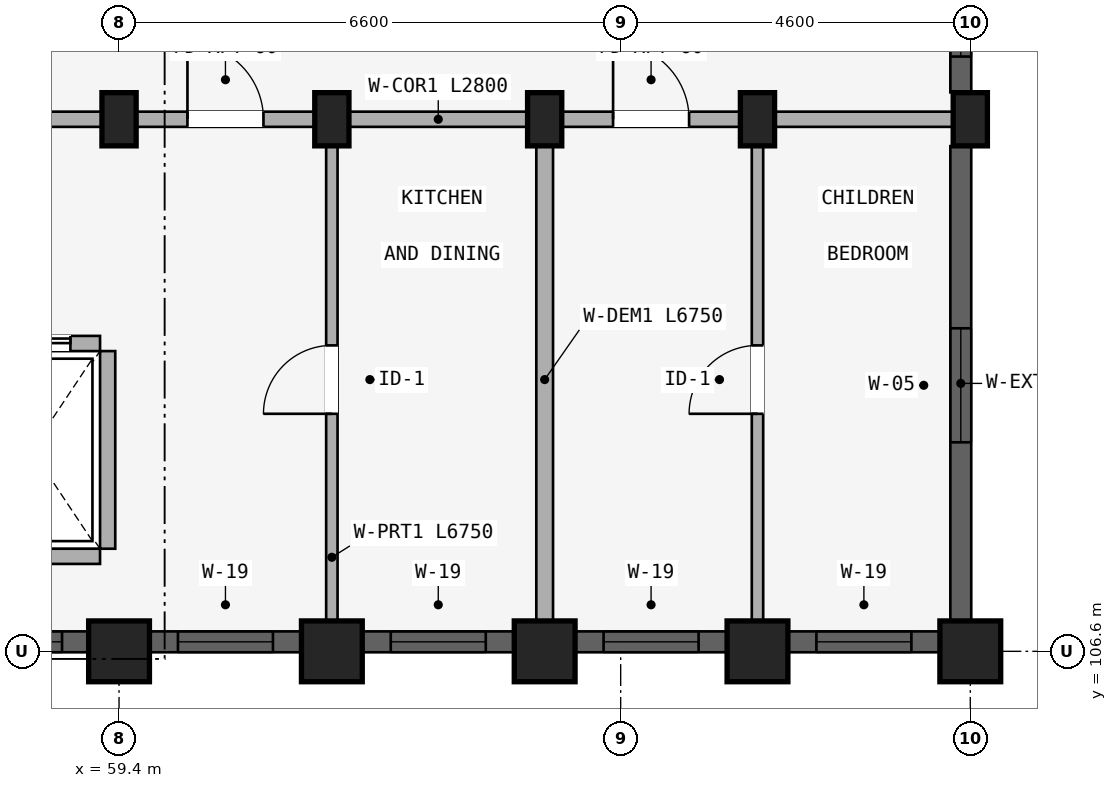
"""IFC4 building model, lengths in metres.
Left out: names, types, materials, properties, quantities, classifications, styles, units other than length and angle.
Written with IfcOpenShell. Run it as: python <this file> out.ifc"""

import sys

from ifc_helpers import new_model, si_unit, direction, frame, frame_2d, origin, origin_2d, place, context, subcontext, project, spatial, rectangle, extrude, element, fill, save


model = new_model("IFC4")
c1 = context("Model", 3, precision=1e-05, world=origin(), true_north=direction((0.0, 1.0)))
c2 = subcontext(c1, "Body", "Model", "MODEL_VIEW")
j1 = project(units=[si_unit("LENGTHUNIT", "METRE"), si_unit("PLANEANGLEUNIT", "RADIAN")], contexts=[c1])
p1 = place(None, origin())
s1 = spatial("IfcSite", under=j1, at=p1, CompositionType="ELEMENT")
p2 = place(p1, origin())
s2 = spatial("IfcBuilding", under=s1, at=p2, CompositionType="ELEMENT")
p3 = place(p2, frame((0.0, 0.0, 11.85)))
s3 = spatial("IfcBuildingStorey", under=s2, at=p3, CompositionType="ELEMENT", Elevation=11.85)
p4 = place(p3, frame((59.4, 106.6, 0.0), z_axis=(0.0, 0.0, 1.0), x_axis=(1.0, 0.0, 0.0)))
e1 = element("IfcColumn", 1, at=p4, inside=s3, PredefinedType="COLUMN", context=c2, shape_type="SweptSolid", body=[
    extrude(rectangle(XDim=0.8, YDim=0.8, at=origin_2d()), origin(), (0.0, 0.0, 1.0), 2.93),
])
p5 = place(p3, frame((59.4, 113.6, 0.0), z_axis=(0.0, 0.0, 1.0), x_axis=(1.0, 0.0, 0.0)))
e2 = element("IfcColumn", 2, at=p5, inside=s3, PredefinedType="COLUMN", context=c2, shape_type="SweptSolid", body=[
    extrude(rectangle(XDim=0.45, YDim=0.7, at=origin_2d()), origin(), (0.0, 0.0, 1.0), 2.93),
])
p6 = place(p3, frame((62.2, 106.6, 0.0), z_axis=(0.0, 0.0, 1.0), x_axis=(1.0, 0.0, 0.0)))
e3 = element("IfcColumn", 3, at=p6, inside=s3, PredefinedType="COLUMN", context=c2, shape_type="SweptSolid", body=[
    extrude(rectangle(XDim=0.8, YDim=0.8, at=origin_2d()), origin(), (0.0, 0.0, 1.0), 2.93),
])
p7 = place(p3, frame((62.2, 113.6, 0.0), z_axis=(0.0, 0.0, 1.0), x_axis=(1.0, 0.0, 0.0)))
e4 = element("IfcColumn", 4, at=p7, inside=s3, PredefinedType="COLUMN", context=c2, shape_type="SweptSolid", body=[
    extrude(rectangle(XDim=0.45, YDim=0.7, at=origin_2d()), origin(), (0.0, 0.0, 1.0), 2.93),
])
p8 = place(p3, frame((65.0, 106.6, 0.0), z_axis=(0.0, 0.0, 1.0), x_axis=(1.0, 0.0, 0.0)))
e5 = element("IfcColumn", 5, at=p8, inside=s3, PredefinedType="COLUMN", context=c2, shape_type="SweptSolid", body=[
    extrude(rectangle(XDim=0.8, YDim=0.8, at=origin_2d()), origin(), (0.0, 0.0, 1.0), 2.93),
])
p9 = place(p3, frame((65.0, 113.6, 0.0), z_axis=(0.0, 0.0, 1.0), x_axis=(1.0, 0.0, 0.0)))
e6 = element("IfcColumn", 6, at=p9, inside=s3, PredefinedType="COLUMN", context=c2, shape_type="SweptSolid", body=[
    extrude(rectangle(XDim=0.45, YDim=0.7, at=origin_2d()), origin(), (0.0, 0.0, 1.0), 2.93),
])
p10 = place(p3, frame((67.8, 106.6, 0.0), z_axis=(0.0, 0.0, 1.0), x_axis=(1.0, 0.0, 0.0)))
e7 = element("IfcColumn", 7, at=p10, inside=s3, PredefinedType="COLUMN", context=c2, shape_type="SweptSolid", body=[
    extrude(rectangle(XDim=0.8, YDim=0.8, at=origin_2d()), origin(), (0.0, 0.0, 1.0), 2.93),
])
p11 = place(p3, frame((67.8, 113.6, 0.0), z_axis=(0.0, 0.0, 1.0), x_axis=(1.0, 0.0, 0.0)))
e8 = element("IfcColumn", 8, at=p11, inside=s3, PredefinedType="COLUMN", context=c2, shape_type="SweptSolid", body=[
    extrude(rectangle(XDim=0.45, YDim=0.7, at=origin_2d()), origin(), (0.0, 0.0, 1.0), 2.93),
])
p12 = place(p3, frame((70.6, 106.6, 0.0), z_axis=(0.0, 0.0, 1.0), x_axis=(1.0, 0.0, 0.0)))
e9 = element("IfcColumn", 9, at=p12, inside=s3, PredefinedType="COLUMN", context=c2, shape_type="SweptSolid", body=[
    extrude(rectangle(XDim=0.8, YDim=0.8, at=origin_2d()), origin(), (0.0, 0.0, 1.0), 2.93),
])
p13 = place(p3, frame((70.6, 113.6, 0.0), z_axis=(0.0, 0.0, 1.0), x_axis=(1.0, 0.0, 0.0)))
e10 = element("IfcColumn", 10, at=p13, inside=s3, PredefinedType="COLUMN", context=c2, shape_type="SweptSolid", body=[
    extrude(rectangle(XDim=0.45, YDim=0.7, at=origin_2d()), origin(), (0.0, 0.0, 1.0), 2.93),
])
p14 = place(p3, frame((59.25, 107.95, 0.0), z_axis=(0.0, 0.0, 1.0), x_axis=(0.0, 1.0, 0.0)))
e11 = element("IfcWall", 11, at=p14, inside=s3, PredefinedType="STANDARD", context=c2, shape_type="SweptSolid", body=[
    extrude(rectangle(XDim=2.6, YDim=0.2, at=frame_2d((1.3, 0.0))), origin(), (0.0, 0.0, 1.0), 2.372),
])
p15 = place(p3, frame((57.35, 107.85, 0.0), z_axis=(0.0, 0.0, 1.0), x_axis=(1.0, 0.0, 0.0)))
e12 = element("IfcWall", 12, at=p15, inside=s3, PredefinedType="STANDARD", context=c2, shape_type="SweptSolid", body=[
    extrude(rectangle(XDim=1.8, YDim=0.2, at=frame_2d((0.9, 0.0))), origin(), (0.0, 0.0, 1.0), 2.93),
])
p16 = place(p3, frame((57.35, 110.65, 0.0), z_axis=(0.0, 0.0, 1.0), x_axis=(1.0, 0.0, 0.0)))
e13 = element("IfcWall", 13, at=p16, inside=s3, PredefinedType="STANDARD", context=c2, shape_type="SweptSolid", body=[
    extrude(rectangle(XDim=1.8, YDim=0.2, at=frame_2d((0.9, 0.0))), origin(), (0.0, 0.0, 1.0), 2.93),
])
p17 = place(p16, frame((0.39, 0.0, 0.0)))
e14 = element("IfcOpeningElement", 14, at=p17, cuts=e13, PredefinedType="OPENING", context=c2, shape_type="SweptSolid", body=[
    extrude(rectangle(XDim=1.02, YDim=2.15, at=frame_2d((0.51, 1.075))), frame((0.0, 0.11, 0.0), z_axis=(0.0, -1.0, 0.0), x_axis=(1.0, 0.0, 0.0)), (0.0, 0.0, 1.0), 0.22),
])
p18 = place(p3, frame((53.75, 113.6, 0.0), z_axis=(0.0, 0.0, 1.0), x_axis=(1.0, 0.0, 0.0)))
e15 = element("IfcWall", 15, at=p18, inside=s3, PredefinedType="STANDARD", context=c2, shape_type="SweptSolid", body=[
    extrude(rectangle(XDim=5.6, YDim=0.2, at=frame_2d((2.8, 0.0))), origin(), (0.0, 0.0, 1.0), 2.372),
])
p19 = place(p18, frame((1.91, 0.0, 0.0)))
e16 = element("IfcOpeningElement", 16, at=p19, cuts=e15, PredefinedType="OPENING", context=c2, shape_type="SweptSolid", body=[
    extrude(rectangle(XDim=1.22, YDim=2.15, at=frame_2d((0.61, 1.075))), frame((0.0, 0.11, 0.0), z_axis=(0.0, -1.0, 0.0), x_axis=(1.0, 0.0, 0.0)), (0.0, 0.0, 1.0), 0.22),
])
p20 = place(p3, frame((59.4, 113.6, 0.0), z_axis=(0.0, 0.0, 1.0), x_axis=(1.0, 0.0, 0.0)))
e17 = element("IfcWall", 17, at=p20, inside=s3, PredefinedType="STANDARD", context=c2, shape_type="SweptSolid", body=[
    extrude(rectangle(XDim=2.8, YDim=0.2, at=frame_2d((1.4, 0.0))), origin(), (0.0, 0.0, 1.0), 2.372),
])
p21 = place(p20, frame((0.9, 0.0, 0.0)))
e18 = element("IfcOpeningElement", 18, at=p21, cuts=e17, PredefinedType="OPENING", context=c2, shape_type="SweptSolid", body=[
    extrude(rectangle(XDim=1.0, YDim=2.15, at=frame_2d((0.5, 1.075))), frame((0.0, 0.11, 0.0), z_axis=(0.0, -1.0, 0.0), x_axis=(1.0, 0.0, 0.0)), (0.0, 0.0, 1.0), 0.22),
])
p22 = place(p3, frame((62.2, 113.6, 0.0), z_axis=(0.0, 0.0, 1.0), x_axis=(1.0, 0.0, 0.0)))
e19 = element("IfcWall", 19, at=p22, inside=s3, PredefinedType="STANDARD", context=c2, shape_type="SweptSolid", body=[
    extrude(rectangle(XDim=2.8, YDim=0.2, at=frame_2d((1.4, 0.0))), origin(), (0.0, 0.0, 1.0), 2.372),
])
p23 = place(p3, frame((65.0, 113.6, 0.0), z_axis=(0.0, 0.0, 1.0), x_axis=(1.0, 0.0, 0.0)))
e20 = element("IfcWall", 20, at=p23, inside=s3, PredefinedType="STANDARD", context=c2, shape_type="SweptSolid", body=[
    extrude(rectangle(XDim=2.8, YDim=0.2, at=frame_2d((1.4, 0.0))), origin(), (0.0, 0.0, 1.0), 2.372),
])
p24 = place(p23, frame((0.9, 0.0, 0.0)))
e21 = element("IfcOpeningElement", 21, at=p24, cuts=e20, PredefinedType="OPENING", context=c2, shape_type="SweptSolid", body=[
    extrude(rectangle(XDim=1.0, YDim=2.15, at=frame_2d((0.5, 1.075))), frame((0.0, 0.11, 0.0), z_axis=(0.0, -1.0, 0.0), x_axis=(1.0, 0.0, 0.0)), (0.0, 0.0, 1.0), 0.22),
])
p25 = place(p3, frame((67.8, 113.6, 0.0), z_axis=(0.0, 0.0, 1.0), x_axis=(1.0, 0.0, 0.0)))
e22 = element("IfcWall", 22, at=p25, inside=s3, PredefinedType="STANDARD", context=c2, shape_type="SweptSolid", body=[
    extrude(rectangle(XDim=2.8, YDim=0.2, at=frame_2d((1.4, 0.0))), origin(), (0.0, 0.0, 1.0), 2.372),
])
p26 = place(p3, frame((62.2, 106.8, 0.0), z_axis=(0.0, 0.0, 1.0), x_axis=(0.0, 1.0, 0.0)))
e23 = element("IfcWall", 23, at=p26, inside=s3, PredefinedType="PARTITIONING", context=c2, shape_type="SweptSolid", body=[
    extrude(rectangle(XDim=6.75, YDim=0.15, at=frame_2d((3.375, 0.0))), origin(), (0.0, 0.0, 1.0), 2.372),
])
p27 = place(p26, frame((2.925, 0.0, 0.0)))
e24 = element("IfcOpeningElement", 24, at=p27, cuts=e23, PredefinedType="OPENING", context=c2, shape_type="SweptSolid", body=[
    extrude(rectangle(XDim=0.9, YDim=2.1, at=frame_2d((0.45, 1.05))), frame((0.0, 0.085, 0.0), z_axis=(0.0, -1.0, 0.0), x_axis=(1.0, 0.0, 0.0)), (0.0, 0.0, 1.0), 0.17),
])
p28 = place(p3, frame((65.0, 106.8, 0.0), z_axis=(0.0, 0.0, 1.0), x_axis=(0.0, 1.0, 0.0)))
e25 = element("IfcWall", 25, at=p28, inside=s3, PredefinedType="STANDARD", context=c2, shape_type="SweptSolid", body=[
    extrude(rectangle(XDim=6.75, YDim=0.22, at=frame_2d((3.375, 0.0))), origin(), (0.0, 0.0, 1.0), 2.372),
])
p29 = place(p3, frame((67.8, 106.8, 0.0), z_axis=(0.0, 0.0, 1.0), x_axis=(0.0, 1.0, 0.0)))
e26 = element("IfcWall", 26, at=p29, inside=s3, PredefinedType="PARTITIONING", context=c2, shape_type="SweptSolid", body=[
    extrude(rectangle(XDim=6.75, YDim=0.15, at=frame_2d((3.375, 0.0))), origin(), (0.0, 0.0, 1.0), 2.372),
])
p30 = place(p29, frame((2.925, 0.0, 0.0)))
e27 = element("IfcOpeningElement", 27, at=p30, cuts=e26, PredefinedType="OPENING", context=c2, shape_type="SweptSolid", body=[
    extrude(rectangle(XDim=0.9, YDim=2.1, at=frame_2d((0.45, 1.05))), frame((0.0, 0.085, 0.0), z_axis=(0.0, -1.0, 0.0), x_axis=(1.0, 0.0, 0.0)), (0.0, 0.0, 1.0), 0.17),
])
p31 = place(p3, frame((56.628, 106.725, 0.0), z_axis=(0.0, 0.0, 1.0), x_axis=(1.0, 0.0, 0.0)))
e28 = element("IfcWall", 28, at=p31, inside=s3, PredefinedType="STANDARD", context=c2, shape_type="SweptSolid", body=[
    extrude(rectangle(XDim=2.422, YDim=0.275, at=frame_2d((1.211, 0.0))), origin(), (0.0, 0.0, 1.0), 2.472),
])
p32 = place(p31, frame((0.822, 0.0, 0.772)))
e29 = element("IfcOpeningElement", 29, at=p32, cuts=e28, PredefinedType="OPENING", context=c2, shape_type="SweptSolid", body=[
    extrude(rectangle(XDim=1.2, YDim=1.5, at=frame_2d((0.6, 0.75))), frame((0.0, 0.147, 0.0), z_axis=(0.0, -1.0, 0.0), x_axis=(1.0, 0.0, 0.0)), (0.0, 0.0, 1.0), 0.295),
])
p33 = place(p3, frame((59.803, 106.725, 0.0), z_axis=(0.0, 0.0, 1.0), x_axis=(1.0, 0.0, 0.0)))
e30 = element("IfcWall", 30, at=p33, inside=s3, PredefinedType="STANDARD", context=c2, shape_type="SweptSolid", body=[
    extrude(rectangle(XDim=1.993, YDim=0.275, at=frame_2d((0.997, 0.0))), origin(), (0.0, 0.0, 1.0), 2.472),
])
p34 = place(p33, frame((0.372, 0.0, 0.722)))
e31 = element("IfcOpeningElement", 31, at=p34, cuts=e30, PredefinedType="OPENING", context=c2, shape_type="SweptSolid", body=[
    extrude(rectangle(XDim=1.25, YDim=1.55, at=frame_2d((0.625, 0.775))), frame((0.0, 0.147, 0.0), z_axis=(0.0, -1.0, 0.0), x_axis=(1.0, 0.0, 0.0)), (0.0, 0.0, 1.0), 0.295),
])
p35 = place(p3, frame((62.604, 106.725, 0.0), z_axis=(0.0, 0.0, 1.0), x_axis=(1.0, 0.0, 0.0)))
e32 = element("IfcWall", 32, at=p35, inside=s3, PredefinedType="STANDARD", context=c2, shape_type="SweptSolid", body=[
    extrude(rectangle(XDim=1.993, YDim=0.275, at=frame_2d((0.997, 0.0))), origin(), (0.0, 0.0, 1.0), 2.472),
])
p36 = place(p35, frame((0.372, 0.0, 0.722)))
e33 = element("IfcOpeningElement", 33, at=p36, cuts=e32, PredefinedType="OPENING", context=c2, shape_type="SweptSolid", body=[
    extrude(rectangle(XDim=1.25, YDim=1.55, at=frame_2d((0.625, 0.775))), frame((0.0, 0.147, 0.0), z_axis=(0.0, -1.0, 0.0), x_axis=(1.0, 0.0, 0.0)), (0.0, 0.0, 1.0), 0.295),
])
p37 = place(p3, frame((65.404, 106.725, 0.0), z_axis=(0.0, 0.0, 1.0), x_axis=(1.0, 0.0, 0.0)))
e34 = element("IfcWall", 34, at=p37, inside=s3, PredefinedType="STANDARD", context=c2, shape_type="SweptSolid", body=[
    extrude(rectangle(XDim=1.993, YDim=0.275, at=frame_2d((0.997, 0.0))), origin(), (0.0, 0.0, 1.0), 2.472),
])
p38 = place(p37, frame((0.372, 0.0, 0.722)))
e35 = element("IfcOpeningElement", 35, at=p38, cuts=e34, PredefinedType="OPENING", context=c2, shape_type="SweptSolid", body=[
    extrude(rectangle(XDim=1.25, YDim=1.55, at=frame_2d((0.625, 0.775))), frame((0.0, 0.147, 0.0), z_axis=(0.0, -1.0, 0.0), x_axis=(1.0, 0.0, 0.0)), (0.0, 0.0, 1.0), 0.295),
])
p39 = place(p3, frame((68.204, 106.725, 0.0), z_axis=(0.0, 0.0, 1.0), x_axis=(1.0, 0.0, 0.0)))
e36 = element("IfcWall", 36, at=p39, inside=s3, PredefinedType="STANDARD", context=c2, shape_type="SweptSolid", body=[
    extrude(rectangle(XDim=1.993, YDim=0.275, at=frame_2d((0.997, 0.0))), origin(), (0.0, 0.0, 1.0), 2.472),
])
p40 = place(p39, frame((0.372, 0.0, 0.722)))
e37 = element("IfcOpeningElement", 37, at=p40, cuts=e36, PredefinedType="OPENING", context=c2, shape_type="SweptSolid", body=[
    extrude(rectangle(XDim=1.25, YDim=1.55, at=frame_2d((0.625, 0.775))), frame((0.0, 0.147, 0.0), z_axis=(0.0, -1.0, 0.0), x_axis=(1.0, 0.0, 0.0)), (0.0, 0.0, 1.0), 0.295),
])
p41 = place(p3, frame((70.475, 107.003, 0.0), z_axis=(0.0, 0.0, 1.0), x_axis=(0.0, 1.0, 0.0)))
e38 = element("IfcWall", 38, at=p41, inside=s3, PredefinedType="STANDARD", context=c2, shape_type="SweptSolid", body=[
    extrude(rectangle(XDim=6.243, YDim=0.275, at=frame_2d((3.122, 0.0))), origin(), (0.0, 0.0, 1.0), 2.372),
])
p42 = place(p41, frame((2.346, 0.0, 0.522)))
e39 = element("IfcOpeningElement", 39, at=p42, cuts=e38, PredefinedType="OPENING", context=c2, shape_type="SweptSolid", body=[
    extrude(rectangle(XDim=1.5, YDim=1.65, at=frame_2d((0.75, 0.825))), frame((0.0, 0.147, 0.0), z_axis=(0.0, -1.0, 0.0), x_axis=(1.0, 0.0, 0.0)), (0.0, 0.0, 1.0), 0.295),
])
p43 = place(p3, frame((70.475, 113.954, 0.0), z_axis=(0.0, 0.0, 1.0), x_axis=(0.0, 1.0, 0.0)))
e40 = element("IfcWall", 40, at=p43, inside=s3, PredefinedType="STANDARD", context=c2, shape_type="SweptSolid", body=[
    extrude(rectangle(XDim=1.693, YDim=0.275, at=frame_2d((0.846, 0.0))), origin(), (0.0, 0.0, 1.0), 2.372),
])
p44 = place(p43, frame((0.471, 0.0, 0.88)))
e41 = element("IfcOpeningElement", 41, at=p44, cuts=e40, PredefinedType="OPENING", context=c2, shape_type="SweptSolid", body=[
    extrude(rectangle(XDim=0.75, YDim=1.05, at=frame_2d((0.375, 0.525))), frame((0.0, 0.147, 0.0), z_axis=(0.0, -1.0, 0.0), x_axis=(1.0, 0.0, 0.0)), (0.0, 0.0, 1.0), 0.295),
])
p45 = place(p32, origin())
e42 = element("IfcWindow", 42, at=p45, inside=s3, PartitioningType="SINGLE_PANEL", PredefinedType="WINDOW", context=c2, shape_type="SweptSolid", body=[
    extrude(rectangle(XDim=1.2, YDim=1.5, at=frame_2d((0.6, 0.75))), frame((0.0, 0.03, 0.0), z_axis=(0.0, -1.0, 0.0), x_axis=(1.0, 0.0, 0.0)), (0.0, 0.0, 1.0), 0.06),
])
fill(e29, e42)
p46 = place(p34, origin())
e43 = element("IfcWindow", 43, at=p46, inside=s3, PartitioningType="SINGLE_PANEL", PredefinedType="WINDOW", context=c2, shape_type="SweptSolid", body=[
    extrude(rectangle(XDim=1.25, YDim=1.55, at=frame_2d((0.625, 0.775))), frame((0.0, 0.03, 0.0), z_axis=(0.0, -1.0, 0.0), x_axis=(1.0, 0.0, 0.0)), (0.0, 0.0, 1.0), 0.06),
])
fill(e31, e43)
p47 = place(p36, origin())
e44 = element("IfcWindow", 44, at=p47, inside=s3, PartitioningType="SINGLE_PANEL", PredefinedType="WINDOW", context=c2, shape_type="SweptSolid", body=[
    extrude(rectangle(XDim=1.25, YDim=1.55, at=frame_2d((0.625, 0.775))), frame((0.0, 0.03, 0.0), z_axis=(0.0, -1.0, 0.0), x_axis=(1.0, 0.0, 0.0)), (0.0, 0.0, 1.0), 0.06),
])
fill(e33, e44)
p48 = place(p38, origin())
e45 = element("IfcWindow", 45, at=p48, inside=s3, PartitioningType="SINGLE_PANEL", PredefinedType="WINDOW", context=c2, shape_type="SweptSolid", body=[
    extrude(rectangle(XDim=1.25, YDim=1.55, at=frame_2d((0.625, 0.775))), frame((0.0, 0.03, 0.0), z_axis=(0.0, -1.0, 0.0), x_axis=(1.0, 0.0, 0.0)), (0.0, 0.0, 1.0), 0.06),
])
fill(e35, e45)
p49 = place(p40, origin())
e46 = element("IfcWindow", 46, at=p49, inside=s3, PartitioningType="SINGLE_PANEL", PredefinedType="WINDOW", context=c2, shape_type="SweptSolid", body=[
    extrude(rectangle(XDim=1.25, YDim=1.55, at=frame_2d((0.625, 0.775))), frame((0.0, 0.03, 0.0), z_axis=(0.0, -1.0, 0.0), x_axis=(1.0, 0.0, 0.0)), (0.0, 0.0, 1.0), 0.06),
])
fill(e37, e46)
p50 = place(p42, origin())
e47 = element("IfcWindow", 47, at=p50, inside=s3, PartitioningType="DOUBLE_PANEL_VERTICAL", PredefinedType="WINDOW", context=c2, shape_type="SweptSolid", body=[
    extrude(rectangle(XDim=1.5, YDim=1.65, at=frame_2d((0.75, 0.825))), frame((0.0, 0.03, 0.0), z_axis=(0.0, -1.0, 0.0), x_axis=(1.0, 0.0, 0.0)), (0.0, 0.0, 1.0), 0.06),
])
fill(e39, e47)
p51 = place(p44, origin())
e48 = element("IfcWindow", 48, at=p51, inside=s3, PartitioningType="SINGLE_PANEL", PredefinedType="WINDOW", context=c2, shape_type="SweptSolid", body=[
    extrude(rectangle(XDim=0.75, YDim=1.05, at=frame_2d((0.375, 0.525))), frame((0.0, 0.03, 0.0), z_axis=(0.0, -1.0, 0.0), x_axis=(1.0, 0.0, 0.0)), (0.0, 0.0, 1.0), 0.06),
])
fill(e41, e48)
p52 = place(p17, origin())
e49 = element("IfcDoor", 49, at=p52, inside=s3, OperationType="SLIDING_TO_RIGHT", PredefinedType="DOOR", context=c2, shape_type="SweptSolid", body=[
    extrude(rectangle(XDim=1.02, YDim=2.15, at=frame_2d((0.51, 1.075))), frame((0.0, 0.025, 0.0), z_axis=(0.0, -1.0, 0.0), x_axis=(1.0, 0.0, 0.0)), (0.0, 0.0, 1.0), 0.05),
])
fill(e14, e49)
p53 = place(p21, frame((1.0, 0.0, 0.0), z_axis=(0.0, 0.0, 1.0), x_axis=(-1.0, 0.0, 0.0)))
e50 = element("IfcDoor", 50, at=p53, inside=s3, OperationType="SINGLE_SWING_RIGHT", PredefinedType="DOOR", context=c2, shape_type="SweptSolid", body=[
    extrude(rectangle(XDim=1.0, YDim=2.15, at=frame_2d((0.5, 1.075))), frame((0.0, 0.025, 0.0), z_axis=(0.0, -1.0, 0.0), x_axis=(1.0, 0.0, 0.0)), (0.0, 0.0, 1.0), 0.05),
])
fill(e18, e50)
p54 = place(p24, frame((1.0, 0.0, 0.0), z_axis=(0.0, 0.0, 1.0), x_axis=(-1.0, 0.0, 0.0)))
e51 = element("IfcDoor", 51, at=p54, inside=s3, OperationType="SINGLE_SWING_RIGHT", PredefinedType="DOOR", context=c2, shape_type="SweptSolid", body=[
    extrude(rectangle(XDim=1.0, YDim=2.15, at=frame_2d((0.5, 1.075))), frame((0.0, 0.025, 0.0), z_axis=(0.0, -1.0, 0.0), x_axis=(1.0, 0.0, 0.0)), (0.0, 0.0, 1.0), 0.05),
])
fill(e21, e51)
p55 = place(p27, origin())
e52 = element("IfcDoor", 52, at=p55, inside=s3, OperationType="SINGLE_SWING_LEFT", PredefinedType="DOOR", context=c2, shape_type="SweptSolid", body=[
    extrude(rectangle(XDim=0.9, YDim=2.1, at=frame_2d((0.45, 1.05))), frame((0.0, 0.025, 0.0), z_axis=(0.0, -1.0, 0.0), x_axis=(1.0, 0.0, 0.0)), (0.0, 0.0, 1.0), 0.05),
])
fill(e24, e52)
p56 = place(p30, frame((0.9, 0.0, 0.0), z_axis=(0.0, 0.0, 1.0), x_axis=(-1.0, 0.0, 0.0)))
e53 = element("IfcDoor", 53, at=p56, inside=s3, OperationType="SINGLE_SWING_RIGHT", PredefinedType="DOOR", context=c2, shape_type="SweptSolid", body=[
    extrude(rectangle(XDim=0.9, YDim=2.1, at=frame_2d((0.45, 1.05))), frame((0.0, 0.025, 0.0), z_axis=(0.0, -1.0, 0.0), x_axis=(1.0, 0.0, 0.0)), (0.0, 0.0, 1.0), 0.05),
])
fill(e27, e53)
save(model, sys.argv[1])
